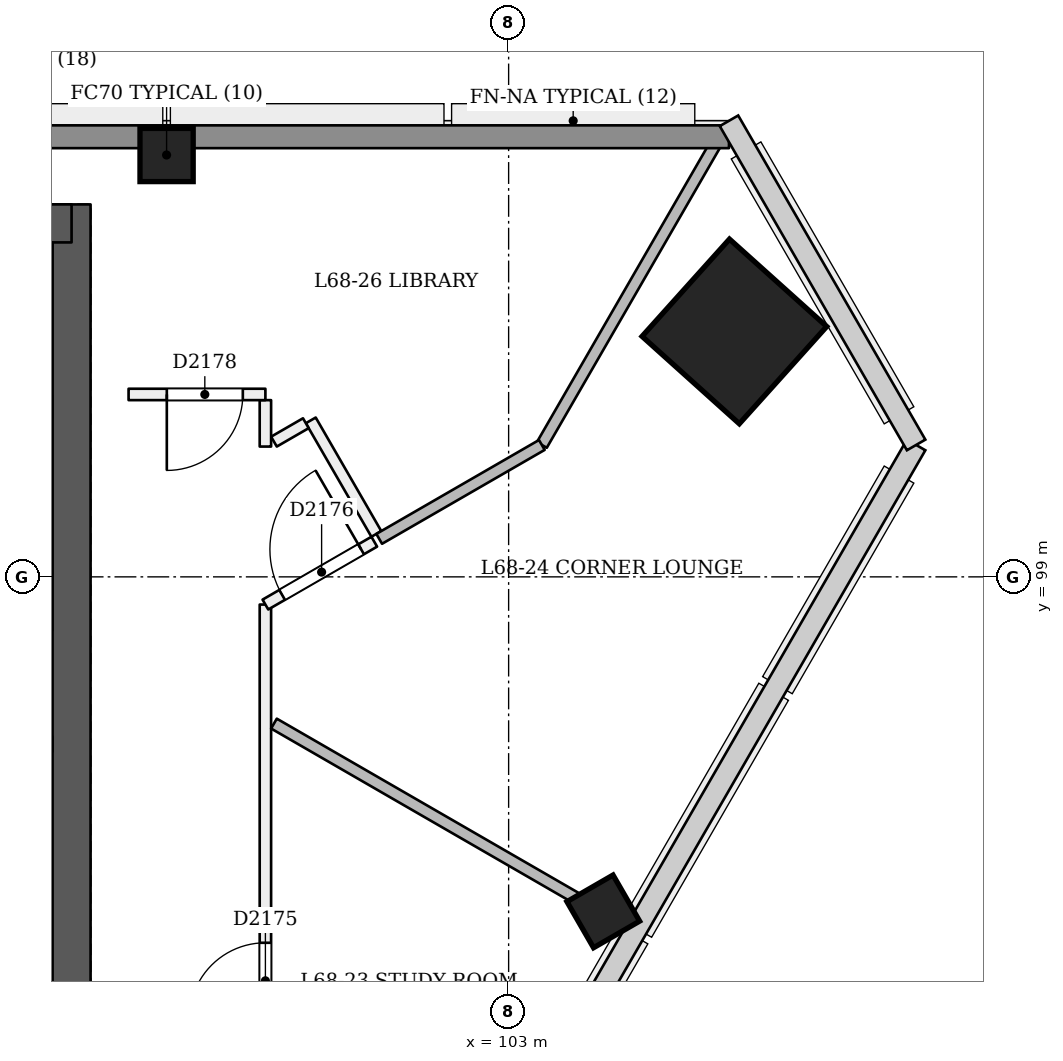
"""IFC4 building model, lengths in metres.
Left out: names, types, materials, properties, quantities, classifications, styles, units other than length and angle.
Written with IfcOpenShell. Run it as: python <this file> out.ifc"""

import sys

from ifc_helpers import new_model, si_unit, direction, frame, frame_2d, origin, origin_2d, place, context, subcontext, project, spatial, rectangle, extrude, element, fill, save


model = new_model("IFC4")
c1 = context("Model", 3, precision=1e-05, world=origin(), true_north=direction((0.0, 1.0)))
c2 = subcontext(c1, "Body", "Model", "MODEL_VIEW")
j1 = project(units=[si_unit("LENGTHUNIT", "METRE"), si_unit("PLANEANGLEUNIT", "RADIAN")], contexts=[c1])
p1 = place(None, origin())
s1 = spatial("IfcSite", under=j1, at=p1, CompositionType="ELEMENT")
p2 = place(p1, origin())
s2 = spatial("IfcBuilding", under=s1, at=p2, CompositionType="ELEMENT")
p3 = place(p2, frame((0.0, 0.0, 264.4)))
s3 = spatial("IfcBuildingStorey", under=s2, at=p3, CompositionType="ELEMENT", Elevation=264.4)
p4 = place(p3, frame((97.25, 93.15, 0.0), z_axis=(0.0, 0.0, 1.0), x_axis=(0.0, 1.0, 0.0)))
e1 = element("IfcWall", 1, at=p4, inside=s3, PredefinedType="SHEAR", context=c2, shape_type="SweptSolid", body=[
    extrude(rectangle(XDim=10.75, YDim=0.5, at=frame_2d((5.375, 0.0))), origin(), (0.0, 0.0, 1.0), 3.6),
])
p5 = place(p3, frame((97.25, 103.65, 0.0), z_axis=(0.0, 0.0, 1.0), x_axis=(-1.0, 0.0, 0.0)))
e2 = element("IfcWall", 2, at=p5, inside=s3, PredefinedType="SHEAR", context=c2, shape_type="SweptSolid", body=[
    extrude(rectangle(XDim=24.75, YDim=0.5, at=frame_2d((12.375, 0.0))), origin(), (0.0, 0.0, 1.0), 3.6),
])
p6 = place(p3, frame((106.004, 102.218, 0.0), z_axis=(-0.028401814599, 0.009218727412, 0.999554076572), x_axis=(0.50075982596, -0.865301300512, 0.022209368232)))
e3 = element("IfcColumn", 3, at=p6, inside=s3, PredefinedType="COLUMN", context=c2, shape_type="SweptSolid", body=[
    extrude(rectangle(XDim=1.72, YDim=1.72, at=origin_2d()), origin(), (0.0, 0.0, 1.0), 3.602),
])
p7 = place(p3, frame((98.5, 104.55, 0.0), z_axis=(0.0, 0.0, 1.0), x_axis=(1.0, 0.0, 0.0)))
e4 = element("IfcColumn", 4, at=p7, inside=s3, PredefinedType="COLUMN", context=c2, shape_type="SweptSolid", body=[
    extrude(rectangle(XDim=0.7, YDim=0.7, at=origin_2d()), origin(), (0.0, 0.0, 1.0), 3.6),
])
p8 = place(p3, frame((104.272, 94.552, -0.023), z_axis=(-0.022212328788, 0.038465252292, 0.999013031354), x_axis=(-0.500174392377, -0.86563984448, 0.022208936481)))
e5 = element("IfcColumn", 5, at=p8, inside=s3, PredefinedType="COLUMN", context=c2, shape_type="SweptSolid", body=[
    extrude(rectangle(XDim=0.7, YDim=0.7, at=origin_2d()), origin(), (0.0, 0.0, 1.0), 3.605),
])
p9 = place(p3, frame((99.8, 90.6, 0.0), z_axis=(0.0, 0.0, 1.0), x_axis=(0.0, 1.0, 0.0)))
e6 = element("IfcWall", 6, at=p9, inside=s3, PredefinedType="PARTITIONING", context=c2, shape_type="SweptSolid", body=[
    extrude(rectangle(XDim=8.036, YDim=0.15, at=frame_2d((4.018, 0.0))), origin(), (0.0, 0.0, 1.0), 3.2),
])
p10 = place(p9, frame((2.586, 0.0, 0.0)))
e7 = element("IfcOpeningElement", 7, at=p10, cuts=e6, PredefinedType="OPENING", context=c2, shape_type="SweptSolid", body=[
    extrude(rectangle(XDim=1.0, YDim=2.1, at=frame_2d((0.5, 1.05))), frame((0.0, 0.085, 0.0), z_axis=(0.0, -1.0, 0.0), x_axis=(1.0, 0.0, 0.0)), (0.0, 0.0, 1.0), 0.171),
])
p11 = place(p3, frame((99.8, 98.636, 0.0), z_axis=(0.0, 0.0, 1.0), x_axis=(0.866072496716, 0.499918423778, 0.0)))
e8 = element("IfcWall", 8, at=p11, inside=s3, PredefinedType="PARTITIONING", context=c2, shape_type="SweptSolid", body=[
    extrude(rectangle(XDim=1.654, YDim=0.15, at=frame_2d((0.827, 0.0))), origin(), (0.0, 0.0, 1.0), 3.2),
])
p12 = place(p11, frame((0.254, 0.0, 0.0)))
e9 = element("IfcOpeningElement", 9, at=p12, cuts=e8, PredefinedType="OPENING", context=c2, shape_type="SweptSolid", body=[
    extrude(rectangle(XDim=1.2, YDim=2.1, at=frame_2d((0.6, 1.05))), frame((0.0, 0.085, 0.0), z_axis=(0.0, -1.0, 0.0), x_axis=(1.0, 0.0, 0.0)), (0.0, 0.0, 1.0), 0.171),
])
p13 = place(p3, frame((101.26, 99.565, 0.0), z_axis=(0.0, 0.0, 1.0), x_axis=(-0.500020560727, 0.866013532718, 0.0)))
e10 = element("IfcWall", 10, at=p13, inside=s3, PredefinedType="PARTITIONING", context=c2, shape_type="SweptSolid", body=[
    extrude(rectangle(XDim=1.725, YDim=0.15, at=frame_2d((0.863, 0.0))), origin(), (0.0, 0.0, 1.0), 3.2),
])
p14 = place(p3, frame((100.332, 101.021, 0.0), z_axis=(0.0, 0.0, 1.0), x_axis=(-0.866000904559, -0.500042431503, 0.0)))
e11 = element("IfcWall", 11, at=p14, inside=s3, PredefinedType="PARTITIONING", context=c2, shape_type="SweptSolid", body=[
    extrude(rectangle(XDim=0.484, YDim=0.15, at=frame_2d((0.242, 0.0))), origin(), (0.0, 0.0, 1.0), 3.2),
])
p15 = place(p3, frame((99.8, 100.714, 0.0), z_axis=(0.0, 0.0, 1.0), x_axis=(0.0, 1.0, 0.0)))
e12 = element("IfcWall", 12, at=p15, inside=s3, PredefinedType="PARTITIONING", context=c2, shape_type="SweptSolid", body=[
    extrude(rectangle(XDim=0.611, YDim=0.15, at=frame_2d((0.305, 0.0))), origin(), (0.0, 0.0, 1.0), 3.2),
])
p16 = place(p3, frame((99.8, 101.4, 0.0), z_axis=(0.0, 0.0, 1.0), x_axis=(-1.0, 0.0, 0.0)))
e13 = element("IfcWall", 13, at=p16, inside=s3, PredefinedType="PARTITIONING", context=c2, shape_type="SweptSolid", body=[
    extrude(rectangle(XDim=1.8, YDim=0.15, at=frame_2d((0.9, 0.0))), origin(), (0.0, 0.0, 1.0), 3.2),
])
p17 = place(p16, frame((0.297, 0.0, 0.0)))
e14 = element("IfcOpeningElement", 14, at=p17, cuts=e13, PredefinedType="OPENING", context=c2, shape_type="SweptSolid", body=[
    extrude(rectangle(XDim=1.0, YDim=2.1, at=frame_2d((0.5, 1.05))), frame((0.0, 0.085, 0.0), z_axis=(0.0, -1.0, 0.0), x_axis=(1.0, 0.0, 0.0)), (0.0, 0.0, 1.0), 0.171),
])
p18 = place(p3, frame((104.575, 94.378, 0.0), z_axis=(0.0, 0.0, 1.0), x_axis=(-0.866018689825, 0.500011628738, 0.0)))
e15 = element("IfcWall", 15, at=p18, inside=s3, PredefinedType="PARTITIONING", context=c2, shape_type="SweptSolid", body=[
    extrude(rectangle(XDim=5.384, YDim=0.15, at=frame_2d((2.692, 0.0))), origin(), (0.0, 0.0, 1.0), 2.7),
])
p19 = place(p3, frame((105.841, 104.9, 0.0), z_axis=(0.0, 0.0, 1.0), x_axis=(-0.499983211839, -0.866035096217, 0.0)))
e16 = element("IfcWall", 16, at=p19, inside=s3, PredefinedType="PARTITIONING", context=c2, shape_type="SweptSolid", body=[
    extrude(rectangle(XDim=4.809, YDim=0.15, at=frame_2d((2.404, 0.0))), origin(), (0.0, 0.0, 1.0), 2.7),
])
p20 = place(p3, frame((103.437, 100.735, 0.0), z_axis=(0.0, 0.0, 1.0), x_axis=(-0.866045730533, -0.499964791386, 0.0)))
e17 = element("IfcWall", 17, at=p20, inside=s3, PredefinedType="PARTITIONING", context=c2, shape_type="SweptSolid", body=[
    extrude(rectangle(XDim=2.471, YDim=0.15, at=frame_2d((1.235, 0.0))), origin(), (0.0, 0.0, 1.0), 3.2),
])
p21 = place(p3, frame((64.101, 104.79, 0.0), z_axis=(0.0, 0.0, 1.0), x_axis=(1.0, 0.0, 0.0)))
e18 = element("IfcWall", 18, at=p21, inside=s3, PredefinedType="SOLIDWALL", context=c2, shape_type="SweptSolid", body=[
    extrude(rectangle(XDim=41.798, YDim=0.3, at=frame_2d((20.899, 0.0))), origin(), (0.0, 0.0, 1.0), 2.7),
])
p22 = place(p10, origin())
e19 = element("IfcDoor", 19, at=p22, inside=s3, OperationType="SINGLE_SWING_LEFT", PredefinedType="NOTDEFINED", context=c2, shape_type="SweptSolid", body=[
    extrude(rectangle(XDim=1.0, YDim=2.1, at=frame_2d((0.5, 1.05))), frame((0.0, 0.025, 0.0), z_axis=(0.0, -1.0, 0.0), x_axis=(1.0, 0.0, 0.0)), (0.0, 0.0, 1.0), 0.05),
])
fill(e7, e19)
p23 = place(p12, origin())
e20 = element("IfcDoor", 20, at=p23, inside=s3, OperationType="SINGLE_SWING_RIGHT", PredefinedType="NOTDEFINED", context=c2, shape_type="SweptSolid", body=[
    extrude(rectangle(XDim=1.2, YDim=2.1, at=frame_2d((0.6, 1.05))), frame((0.0, 0.025, 0.0), z_axis=(0.0, -1.0, 0.0), x_axis=(1.0, 0.0, 0.0)), (0.0, 0.0, 1.0), 0.05),
])
fill(e9, e20)
p24 = place(p17, origin())
e21 = element("IfcDoor", 21, at=p24, inside=s3, OperationType="SINGLE_SWING_RIGHT", PredefinedType="NOTDEFINED", context=c2, shape_type="SweptSolid", body=[
    extrude(rectangle(XDim=1.0, YDim=2.1, at=frame_2d((0.5, 1.05))), frame((0.0, 0.025, 0.0), z_axis=(0.0, -1.0, 0.0), x_axis=(1.0, 0.0, 0.0)), (0.0, 0.0, 1.0), 0.05),
])
fill(e14, e21)
save(model, sys.argv[1])
